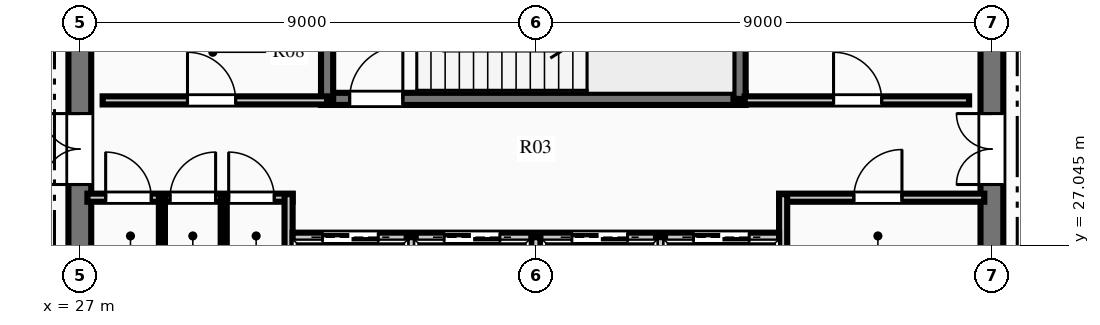
"""IFC4 building model, lengths in metres.
Left out: names, types, materials, properties, quantities, classifications, styles, units other than length and angle.
Written with IfcOpenShell. Run it as: python <this file> out.ifc"""

import sys

from ifc_helpers import new_model, si_unit, direction, frame, frame_2d, origin, place, context, subcontext, project, spatial, rectangle, extrude, element, fill, save


model = new_model("IFC4")
c1 = context("Model", 3, precision=1e-05, world=origin(), true_north=direction((0.0, 1.0)))
c2 = subcontext(c1, "Body", "Model", "MODEL_VIEW")
j1 = project(units=[si_unit("LENGTHUNIT", "METRE"), si_unit("PLANEANGLEUNIT", "RADIAN")], contexts=[c1])
p1 = place(None, origin())
s1 = spatial("IfcSite", under=j1, at=p1, CompositionType="ELEMENT")
p2 = place(p1, origin())
s2 = spatial("IfcBuilding", under=s1, at=p2, CompositionType="ELEMENT")
p3 = place(p2, frame((0.0, 0.0, 347.7)))
s3 = spatial("IfcBuildingStorey", under=s2, at=p3, CompositionType="ELEMENT", Elevation=347.7)
p4 = place(p3, frame((27.0, 18.225, 0.0), z_axis=(0.0, 0.0, 1.0), x_axis=(0.0, 1.0, 0.0)))
e1 = element("IfcWall", 1, at=p4, inside=s3, PredefinedType="SHEAR", context=c2, shape_type="SweptSolid", body=[
    extrude(rectangle(XDim=15.55, YDim=0.45, at=frame_2d((7.775, 0.0))), origin(), (0.0, 0.0, 1.0), 4.5),
])
p5 = place(p4, frame((10.015, 0.0, 0.0)))
e2 = element("IfcOpeningElement", 2, at=p5, cuts=e1, PredefinedType="OPENING", context=c2, shape_type="SweptSolid", body=[
    extrude(rectangle(XDim=1.4, YDim=2.2, at=frame_2d((0.7, 1.1))), frame((0.0, 0.235, 0.0), z_axis=(0.0, -1.0, 0.0), x_axis=(1.0, 0.0, 0.0)), (0.0, 0.0, 1.0), 0.47),
])
p6 = place(p3, frame((45.0, 18.225, 0.0), z_axis=(0.0, 0.0, 1.0), x_axis=(0.0, 1.0, 0.0)))
e3 = element("IfcWall", 3, at=p6, inside=s3, PredefinedType="SHEAR", context=c2, shape_type="SweptSolid", body=[
    extrude(rectangle(XDim=15.55, YDim=0.45, at=frame_2d((7.775, 0.0))), origin(), (0.0, 0.0, 1.0), 4.5),
])
p7 = place(p6, frame((10.015, 0.0, 0.0)))
e4 = element("IfcOpeningElement", 4, at=p7, cuts=e3, PredefinedType="OPENING", context=c2, shape_type="SweptSolid", body=[
    extrude(rectangle(XDim=1.4, YDim=2.2, at=frame_2d((0.7, 1.1))), frame((0.0, 0.235, 0.0), z_axis=(0.0, -1.0, 0.0), x_axis=(1.0, 0.0, 0.0)), (0.0, 0.0, 1.0), 0.47),
])
p8 = place(p3, frame((31.76, 29.93, 0.0), z_axis=(0.0, 0.0, 1.0), x_axis=(1.0, 0.0, 0.0)))
e5 = element("IfcWall", 5, at=p8, inside=s3, PredefinedType="SHEAR", context=c2, shape_type="SweptSolid", body=[
    extrude(rectangle(XDim=8.38, YDim=0.24, at=frame_2d((4.19, 0.0))), origin(), (0.0, 0.0, 1.0), 4.5),
])
p9 = place(p8, frame((0.565, 0.0, 0.0)))
e6 = element("IfcOpeningElement", 6, at=p9, cuts=e5, PredefinedType="OPENING", context=c2, shape_type="SweptSolid", body=[
    extrude(rectangle(XDim=1.05, YDim=2.15, at=frame_2d((0.525, 1.075))), frame((0.0, 0.13, 0.0), z_axis=(0.0, -1.0, 0.0), x_axis=(1.0, 0.0, 0.0)), (0.0, 0.0, 1.0), 0.26),
])
p10 = place(p3, frame((31.88, 29.93, 0.0), z_axis=(0.0, 0.0, 1.0), x_axis=(0.0, 1.0, 0.0)))
e7 = element("IfcWall", 7, at=p10, inside=s3, PredefinedType="SHEAR", context=c2, shape_type="SweptSolid", body=[
    extrude(rectangle(XDim=3.79, YDim=0.24, at=frame_2d((1.895, 0.0))), origin(), (0.0, 0.0, 1.0), 4.5),
])
p11 = place(p3, frame((40.02, 29.93, 0.0), z_axis=(0.0, 0.0, 1.0), x_axis=(0.0, 1.0, 0.0)))
e8 = element("IfcWall", 8, at=p11, inside=s3, PredefinedType="SHEAR", context=c2, shape_type="SweptSolid", body=[
    extrude(rectangle(XDim=3.85, YDim=0.24, at=frame_2d((1.925, 0.0))), origin(), (0.0, 0.0, 1.0), 4.5),
])
p12 = place(p3, frame((27.15, 27.98, 0.0), z_axis=(0.0, 0.0, 1.0), x_axis=(1.0, 0.0, 0.0)))
e9 = element("IfcWall", 9, at=p12, inside=s3, PredefinedType="PARTITIONING", context=c2, shape_type="SweptSolid", body=[
    extrude(rectangle(XDim=4.05, YDim=0.16, at=frame_2d((2.025, 0.0))), origin(), (0.0, 0.0, 1.0), 4.1),
])
p13 = place(p12, frame((0.36, 0.0, 0.0)))
e10 = element("IfcOpeningElement", 10, at=p13, cuts=e9, PredefinedType="OPENING", context=c2, shape_type="SweptSolid", body=[
    extrude(rectangle(XDim=0.9, YDim=2.15, at=frame_2d((0.45, 1.075))), frame((0.0, 0.09, 0.0), z_axis=(0.0, -1.0, 0.0), x_axis=(1.0, 0.0, 0.0)), (0.0, 0.0, 1.0), 0.18),
])
p14 = place(p12, frame((1.63, 0.0, 0.0)))
e11 = element("IfcOpeningElement", 11, at=p14, cuts=e9, PredefinedType="OPENING", context=c2, shape_type="SweptSolid", body=[
    extrude(rectangle(XDim=0.9, YDim=2.15, at=frame_2d((0.45, 1.075))), frame((0.0, 0.09, 0.0), z_axis=(0.0, -1.0, 0.0), x_axis=(1.0, 0.0, 0.0)), (0.0, 0.0, 1.0), 0.18),
])
p15 = place(p12, frame((2.788, 0.0, 0.0)))
e12 = element("IfcOpeningElement", 12, at=p15, cuts=e9, PredefinedType="OPENING", context=c2, shape_type="SweptSolid", body=[
    extrude(rectangle(XDim=0.9, YDim=2.15, at=frame_2d((0.45, 1.075))), frame((0.0, 0.09, 0.0), z_axis=(0.0, -1.0, 0.0), x_axis=(1.0, 0.0, 0.0)), (0.0, 0.0, 1.0), 0.18),
])
p16 = place(p3, frame((31.12, 26.54, 0.0), z_axis=(0.0, 0.0, 1.0), x_axis=(0.0, 1.0, 0.0)))
e13 = element("IfcWall", 13, at=p16, inside=s3, PredefinedType="PARTITIONING", context=c2, shape_type="SweptSolid", body=[
    extrude(rectangle(XDim=1.51, YDim=0.16, at=frame_2d((0.755, 0.0))), origin(), (0.0, 0.0, 1.0), 4.1),
])
p17 = place(p3, frame((40.8, 27.98, 0.0), z_axis=(0.0, 0.0, 1.0), x_axis=(1.0, 0.0, 0.0)))
e14 = element("IfcWall", 14, at=p17, inside=s3, PredefinedType="PARTITIONING", context=c2, shape_type="SweptSolid", body=[
    extrude(rectangle(XDim=4.05, YDim=0.16, at=frame_2d((2.025, 0.0))), origin(), (0.0, 0.0, 1.0), 4.1),
])
p18 = place(p17, frame((1.475, 0.0, 0.0)))
e15 = element("IfcOpeningElement", 15, at=p18, cuts=e14, PredefinedType="OPENING", context=c2, shape_type="SweptSolid", body=[
    extrude(rectangle(XDim=0.95, YDim=2.15, at=frame_2d((0.475, 1.075))), frame((0.0, 0.09, 0.0), z_axis=(0.0, -1.0, 0.0), x_axis=(1.0, 0.0, 0.0)), (0.0, 0.0, 1.0), 0.18),
])
p19 = place(p3, frame((40.88, 26.54, 0.0), z_axis=(0.0, 0.0, 1.0), x_axis=(0.0, 1.0, 0.0)))
e16 = element("IfcWall", 16, at=p19, inside=s3, PredefinedType="PARTITIONING", context=c2, shape_type="SweptSolid", body=[
    extrude(rectangle(XDim=1.51, YDim=0.16, at=frame_2d((0.755, 0.0))), origin(), (0.0, 0.0, 1.0), 4.1),
])
for number, where, z_axis, x_axis in (
    (17, (28.62, 26.54, 0.0), (0.0, 0.0, 1.0), (0.0, 1.0, 0.0)),
    (18, (29.84, 26.54, 0.0), (0.0, 0.0, 1.0), (0.0, 1.0, 0.0)),
):
    element("IfcWall", number, at=place(p3, frame(where, z_axis=z_axis, x_axis=x_axis)), inside=s3, PredefinedType="PARTITIONING", context=c2, shape_type="SweptSolid", body=[
        extrude(rectangle(XDim=1.44, YDim=0.12, at=frame_2d((0.72, 0.0))), origin(), (0.0, 0.0, 1.0), 4.1),
    ])
p20 = place(p3, frame((27.45, 29.9, 0.0), z_axis=(0.0, 0.0, 1.0), x_axis=(1.0, 0.0, 0.0)))
e19 = element("IfcWall", 19, at=p20, inside=s3, PredefinedType="PARTITIONING", context=c2, shape_type="SweptSolid", body=[
    extrude(rectangle(XDim=4.43, YDim=0.16, at=frame_2d((2.215, 0.0))), origin(), (0.0, 0.0, 1.0), 4.1),
])
p21 = place(p20, frame((1.675, 0.0, 0.0)))
e20 = element("IfcOpeningElement", 20, at=p21, cuts=e19, PredefinedType="OPENING", context=c2, shape_type="SweptSolid", body=[
    extrude(rectangle(XDim=0.95, YDim=2.15, at=frame_2d((0.475, 1.075))), frame((0.0, 0.09, 0.0), z_axis=(0.0, -1.0, 0.0), x_axis=(1.0, 0.0, 0.0)), (0.0, 0.0, 1.0), 0.18),
])
p22 = place(p3, frame((40.12, 29.9, 0.0), z_axis=(0.0, 0.0, 1.0), x_axis=(1.0, 0.0, 0.0)))
e21 = element("IfcWall", 21, at=p22, inside=s3, PredefinedType="PARTITIONING", context=c2, shape_type="SweptSolid", body=[
    extrude(rectangle(XDim=4.43, YDim=0.16, at=frame_2d((2.215, 0.0))), origin(), (0.0, 0.0, 1.0), 4.1),
])
p23 = place(p22, frame((1.755, 0.0, 0.0)))
e22 = element("IfcOpeningElement", 22, at=p23, cuts=e21, PredefinedType="OPENING", context=c2, shape_type="SweptSolid", body=[
    extrude(rectangle(XDim=0.95, YDim=2.15, at=frame_2d((0.475, 1.075))), frame((0.0, 0.09, 0.0), z_axis=(0.0, -1.0, 0.0), x_axis=(1.0, 0.0, 0.0)), (0.0, 0.0, 1.0), 0.18),
])
p24 = place(p3, frame((31.2, 27.2, 0.0), z_axis=(0.0, 0.0, 1.0), x_axis=(1.0, 0.0, 0.0)))
e23 = element("IfcWall", 23, at=p24, inside=s3, PredefinedType="PARTITIONING", context=c2, shape_type="SweptSolid", body=[
    extrude(rectangle(XDim=9.6, YDim=0.18, at=frame_2d((4.8, 0.0))), origin(), (0.0, 0.0, 1.0), 4.1),
])
p25 = place(p24, frame((0.59, 0.0, 0.0)))
e24 = element("IfcOpeningElement", 24, at=p25, cuts=e23, PredefinedType="OPENING", context=c2, shape_type="SweptSolid", body=[
    extrude(rectangle(XDim=1.1, YDim=2.15, at=frame_2d((0.55, 1.075))), frame((0.0, 0.1, 0.0), z_axis=(0.0, -1.0, 0.0), x_axis=(1.0, 0.0, 0.0)), (0.0, 0.0, 1.0), 0.2),
])
p26 = place(p24, frame((2.99, 0.0, 0.0)))
e25 = element("IfcOpeningElement", 25, at=p26, cuts=e23, PredefinedType="OPENING", context=c2, shape_type="SweptSolid", body=[
    extrude(rectangle(XDim=1.1, YDim=2.15, at=frame_2d((0.55, 1.075))), frame((0.0, 0.1, 0.0), z_axis=(0.0, -1.0, 0.0), x_axis=(1.0, 0.0, 0.0)), (0.0, 0.0, 1.0), 0.2),
])
p27 = place(p24, frame((5.51, 0.0, 0.0)))
e26 = element("IfcOpeningElement", 26, at=p27, cuts=e23, PredefinedType="OPENING", context=c2, shape_type="SweptSolid", body=[
    extrude(rectangle(XDim=1.1, YDim=2.15, at=frame_2d((0.55, 1.075))), frame((0.0, 0.1, 0.0), z_axis=(0.0, -1.0, 0.0), x_axis=(1.0, 0.0, 0.0)), (0.0, 0.0, 1.0), 0.2),
])
p28 = place(p24, frame((7.91, 0.0, 0.0)))
e27 = element("IfcOpeningElement", 27, at=p28, cuts=e23, PredefinedType="OPENING", context=c2, shape_type="SweptSolid", body=[
    extrude(rectangle(XDim=1.1, YDim=2.15, at=frame_2d((0.55, 1.075))), frame((0.0, 0.1, 0.0), z_axis=(0.0, -1.0, 0.0), x_axis=(1.0, 0.0, 0.0)), (0.0, 0.0, 1.0), 0.2),
])
for number, where, z_axis, x_axis in (
    (28, (33.54, 25.3, 0.0), (0.0, 0.0, 1.0), (0.0, 1.0, 0.0)),
    (29, (36.0, 25.3, 0.0), (0.0, 0.0, 1.0), (0.0, 1.0, 0.0)),
    (30, (38.46, 25.3, 0.0), (0.0, 0.0, 1.0), (0.0, 1.0, 0.0)),
):
    element("IfcWall", number, at=place(p3, frame(where, z_axis=z_axis, x_axis=x_axis)), inside=s3, PredefinedType="PARTITIONING", context=c2, shape_type="SweptSolid", body=[
        extrude(rectangle(XDim=1.9, YDim=0.18, at=frame_2d((0.95, 0.0))), origin(), (0.0, 0.0, 1.0), 4.1),
    ])
p29 = place(p13, origin())
e31 = element("IfcDoor", 31, at=p29, inside=s3, OperationType="SINGLE_SWING_LEFT", PredefinedType="DOOR", context=c2, shape_type="SweptSolid", body=[
    extrude(rectangle(XDim=0.9, YDim=2.15, at=frame_2d((0.45, 1.075))), frame((0.0, 0.025, 0.0), z_axis=(0.0, -1.0, 0.0), x_axis=(1.0, 0.0, 0.0)), (0.0, 0.0, 1.0), 0.05),
])
fill(e10, e31)
p30 = place(p14, origin())
e32 = element("IfcDoor", 32, at=p30, inside=s3, OperationType="SINGLE_SWING_RIGHT", PredefinedType="DOOR", context=c2, shape_type="SweptSolid", body=[
    extrude(rectangle(XDim=0.9, YDim=2.15, at=frame_2d((0.45, 1.075))), frame((0.0, 0.025, 0.0), z_axis=(0.0, -1.0, 0.0), x_axis=(1.0, 0.0, 0.0)), (0.0, 0.0, 1.0), 0.05),
])
fill(e11, e32)
p31 = place(p15, origin())
e33 = element("IfcDoor", 33, at=p31, inside=s3, OperationType="SINGLE_SWING_LEFT", PredefinedType="DOOR", context=c2, shape_type="SweptSolid", body=[
    extrude(rectangle(XDim=0.9, YDim=2.15, at=frame_2d((0.45, 1.075))), frame((0.0, 0.025, 0.0), z_axis=(0.0, -1.0, 0.0), x_axis=(1.0, 0.0, 0.0)), (0.0, 0.0, 1.0), 0.05),
])
fill(e12, e33)
p32 = place(p18, origin())
e34 = element("IfcDoor", 34, at=p32, inside=s3, OperationType="SINGLE_SWING_RIGHT", PredefinedType="DOOR", context=c2, shape_type="SweptSolid", body=[
    extrude(rectangle(XDim=0.95, YDim=2.15, at=frame_2d((0.475, 1.075))), frame((0.0, 0.025, 0.0), z_axis=(0.0, -1.0, 0.0), x_axis=(1.0, 0.0, 0.0)), (0.0, 0.0, 1.0), 0.05),
])
fill(e15, e34)
p33 = place(p21, origin())
e35 = element("IfcDoor", 35, at=p33, inside=s3, OperationType="SINGLE_SWING_LEFT", PredefinedType="DOOR", context=c2, shape_type="SweptSolid", body=[
    extrude(rectangle(XDim=0.95, YDim=2.15, at=frame_2d((0.475, 1.075))), frame((0.0, 0.025, 0.0), z_axis=(0.0, -1.0, 0.0), x_axis=(1.0, 0.0, 0.0)), (0.0, 0.0, 1.0), 0.05),
])
fill(e20, e35)
p34 = place(p23, origin())
e36 = element("IfcDoor", 36, at=p34, inside=s3, OperationType="SINGLE_SWING_LEFT", PredefinedType="DOOR", context=c2, shape_type="SweptSolid", body=[
    extrude(rectangle(XDim=0.95, YDim=2.15, at=frame_2d((0.475, 1.075))), frame((0.0, 0.025, 0.0), z_axis=(0.0, -1.0, 0.0), x_axis=(1.0, 0.0, 0.0)), (0.0, 0.0, 1.0), 0.05),
])
fill(e22, e36)
p35 = place(p9, origin())
e37 = element("IfcDoor", 37, at=p35, inside=s3, OperationType="SINGLE_SWING_RIGHT", PredefinedType="DOOR", context=c2, shape_type="SweptSolid", body=[
    extrude(rectangle(XDim=1.05, YDim=2.15, at=frame_2d((0.525, 1.075))), frame((0.0, 0.025, 0.0), z_axis=(0.0, -1.0, 0.0), x_axis=(1.0, 0.0, 0.0)), (0.0, 0.0, 1.0), 0.05),
])
fill(e6, e37)
p36 = place(p5, origin())
e38 = element("IfcDoor", 38, at=p36, inside=s3, OperationType="DOUBLE_DOOR_SINGLE_SWING", PredefinedType="DOOR", context=c2, shape_type="SweptSolid", body=[
    extrude(rectangle(XDim=1.4, YDim=2.2, at=frame_2d((0.7, 1.1))), frame((0.0, 0.025, 0.0), z_axis=(0.0, -1.0, 0.0), x_axis=(1.0, 0.0, 0.0)), (0.0, 0.0, 1.0), 0.05),
])
fill(e2, e38)
p37 = place(p7, origin())
e39 = element("IfcDoor", 39, at=p37, inside=s3, OperationType="DOUBLE_DOOR_SINGLE_SWING", PredefinedType="DOOR", context=c2, shape_type="SweptSolid", body=[
    extrude(rectangle(XDim=1.4, YDim=2.2, at=frame_2d((0.7, 1.1))), frame((0.0, 0.025, 0.0), z_axis=(0.0, -1.0, 0.0), x_axis=(1.0, 0.0, 0.0)), (0.0, 0.0, 1.0), 0.05),
])
fill(e4, e39)
p38 = place(p25, origin())
e40 = element("IfcDoor", 40, at=p38, inside=s3, OperationType="SLIDING_TO_LEFT", PredefinedType="DOOR", context=c2, shape_type="SweptSolid", body=[
    extrude(rectangle(XDim=1.1, YDim=2.15, at=frame_2d((0.55, 1.075))), frame((0.0, 0.025, 0.0), z_axis=(0.0, -1.0, 0.0), x_axis=(1.0, 0.0, 0.0)), (0.0, 0.0, 1.0), 0.05),
])
fill(e24, e40)
p39 = place(p26, origin())
e41 = element("IfcDoor", 41, at=p39, inside=s3, OperationType="SLIDING_TO_LEFT", PredefinedType="DOOR", context=c2, shape_type="SweptSolid", body=[
    extrude(rectangle(XDim=1.1, YDim=2.15, at=frame_2d((0.55, 1.075))), frame((0.0, 0.025, 0.0), z_axis=(0.0, -1.0, 0.0), x_axis=(1.0, 0.0, 0.0)), (0.0, 0.0, 1.0), 0.05),
])
fill(e25, e41)
p40 = place(p27, origin())
e42 = element("IfcDoor", 42, at=p40, inside=s3, OperationType="SLIDING_TO_LEFT", PredefinedType="DOOR", context=c2, shape_type="SweptSolid", body=[
    extrude(rectangle(XDim=1.1, YDim=2.15, at=frame_2d((0.55, 1.075))), frame((0.0, 0.025, 0.0), z_axis=(0.0, -1.0, 0.0), x_axis=(1.0, 0.0, 0.0)), (0.0, 0.0, 1.0), 0.05),
])
fill(e26, e42)
p41 = place(p28, origin())
e43 = element("IfcDoor", 43, at=p41, inside=s3, OperationType="SLIDING_TO_LEFT", PredefinedType="DOOR", context=c2, shape_type="SweptSolid", body=[
    extrude(rectangle(XDim=1.1, YDim=2.15, at=frame_2d((0.55, 1.075))), frame((0.0, 0.025, 0.0), z_axis=(0.0, -1.0, 0.0), x_axis=(1.0, 0.0, 0.0)), (0.0, 0.0, 1.0), 0.05),
])
fill(e27, e43)
save(model, sys.argv[1])
